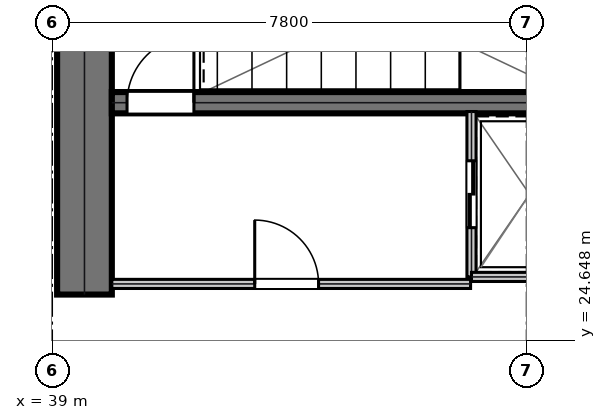
"""IFC4 building model, lengths in metres.
Left out: names, types, materials, properties, quantities, classifications, styles, units other than length and angle.
Written with IfcOpenShell. Run it as: python <this file> out.ifc"""

import sys

from ifc_helpers import new_model, si_unit, direction, frame, frame_2d, origin, place, context, subcontext, project, spatial, rectangle, extrude, element, fill, save


model = new_model("IFC4")
c1 = context("Model", 3, precision=1e-05, world=origin(), true_north=direction((0.0, 1.0)))
c2 = subcontext(c1, "Body", "Model", "MODEL_VIEW")
j1 = project(units=[si_unit("LENGTHUNIT", "METRE"), si_unit("PLANEANGLEUNIT", "RADIAN")], contexts=[c1])
p1 = place(None, origin())
s1 = spatial("IfcSite", under=j1, at=p1, CompositionType="ELEMENT")
p2 = place(p1, origin())
s2 = spatial("IfcBuilding", under=s1, at=p2, CompositionType="ELEMENT")
p3 = place(p2, frame((0.0, 0.0, 27.0)))
s3 = spatial("IfcBuildingStorey", under=s2, at=p3, CompositionType="ELEMENT", Elevation=27.0)
p4 = place(p3, frame((39.53, 25.4, 0.0), z_axis=(0.0, 0.0, 1.0), x_axis=(0.0, 1.0, 0.0)))
e1 = element("IfcWall", 1, at=p4, inside=s3, PredefinedType="SHEAR", context=c2, shape_type="SweptSolid", body=[
    extrude(rectangle(XDim=6.15, YDim=0.9, at=frame_2d((3.075, 0.0))), origin(), (0.0, 0.0, 1.0), 5.08),
])
p5 = place(p3, frame((39.98, 28.555, 0.0), z_axis=(0.0, 0.0, 1.0), x_axis=(1.0, 0.0, 0.0)))
e2 = element("IfcWall", 2, at=p5, inside=s3, PredefinedType="SHEAR", context=c2, shape_type="SweptSolid", body=[
    extrude(rectangle(XDim=7.71, YDim=0.35, at=frame_2d((3.855, 0.0))), origin(), (0.0, 0.0, 1.0), 5.08),
])
p6 = place(p5, frame((0.25, 0.0, 0.0)))
e3 = element("IfcOpeningElement", 3, at=p6, cuts=e2, PredefinedType="OPENING", context=c2, shape_type="SweptSolid", body=[
    extrude(rectangle(XDim=1.1, YDim=2.15, at=frame_2d((0.55, 1.075))), frame((0.0, 0.185, 0.0), z_axis=(0.0, -1.0, 0.0), x_axis=(1.0, 0.0, 0.0)), (0.0, 0.0, 1.0), 0.37),
])
p7 = place(p3, frame((39.98, 25.575, 0.0), z_axis=(0.0, 0.0, 1.0), x_axis=(1.0, 0.0, 0.0)))
e4 = element("IfcWall", 4, at=p7, inside=s3, PredefinedType="PARTITIONING", context=c2, shape_type="SweptSolid", body=[
    extrude(rectangle(XDim=5.9, YDim=0.15, at=frame_2d((2.95, 0.0))), origin(), (0.0, 0.0, 1.0), 5.08),
])
p8 = place(p7, frame((2.35, 0.0, 0.0)))
e5 = element("IfcOpeningElement", 5, at=p8, cuts=e4, PredefinedType="OPENING", context=c2, shape_type="SweptSolid", body=[
    extrude(rectangle(XDim=1.05, YDim=2.15, at=frame_2d((0.525, 1.075))), frame((0.0, 0.085, 0.0), z_axis=(0.0, -1.0, 0.0), x_axis=(1.0, 0.0, 0.0)), (0.0, 0.0, 1.0), 0.17),
])
p9 = place(p3, frame((45.895, 25.69, 0.0), z_axis=(0.0, 0.0, 1.0), x_axis=(0.0, 1.0, 0.0)))
e6 = element("IfcWall", 6, at=p9, inside=s3, PredefinedType="PARTITIONING", context=c2, shape_type="SweptSolid", body=[
    extrude(rectangle(XDim=2.72, YDim=0.15, at=frame_2d((1.36, 0.0))), origin(), (0.0, 0.0, 1.0), 5.08),
])
p10 = place(p9, frame((0.81, 0.0, 0.0)))
e7 = element("IfcOpeningElement", 7, at=p10, cuts=e6, PredefinedType="OPENING", context=c2, shape_type="SweptSolid", body=[
    extrude(rectangle(XDim=1.1, YDim=2.15, at=frame_2d((0.55, 1.075))), frame((0.0, 0.085, 0.0), z_axis=(0.0, -1.0, 0.0), x_axis=(1.0, 0.0, 0.0)), (0.0, 0.0, 1.0), 0.17),
])
p11 = place(p3, frame((45.895, 25.69, 0.0), z_axis=(0.0, 0.0, 1.0), x_axis=(1.0, 0.0, 0.0)))
e8 = element("IfcWall", 8, at=p11, inside=s3, PredefinedType="PARTITIONING", context=c2, shape_type="SweptSolid", body=[
    extrude(rectangle(XDim=1.915, YDim=0.15, at=frame_2d((0.958, 0.0))), origin(), (0.0, 0.0, 1.0), 5.08),
])
p12 = place(p8, origin())
e9 = element("IfcDoor", 9, at=p12, inside=s3, OperationType="SINGLE_SWING_LEFT", PredefinedType="DOOR", context=c2, shape_type="SweptSolid", body=[
    extrude(rectangle(XDim=1.05, YDim=2.15, at=frame_2d((0.525, 1.075))), frame((0.0, 0.025, 0.0), z_axis=(0.0, -1.0, 0.0), x_axis=(1.0, 0.0, 0.0)), (0.0, 0.0, 1.0), 0.05),
])
fill(e5, e9)
p13 = place(p10, frame((1.1, 0.0, 0.0), z_axis=(0.0, 0.0, 1.0), x_axis=(-1.0, 0.0, 0.0)))
e10 = element("IfcDoor", 10, at=p13, inside=s3, OperationType="DOUBLE_DOOR_SLIDING", PredefinedType="DOOR", context=c2, shape_type="SweptSolid", body=[
    extrude(rectangle(XDim=1.1, YDim=2.15, at=frame_2d((0.55, 1.075))), frame((0.0, 0.025, 0.0), z_axis=(0.0, -1.0, 0.0), x_axis=(1.0, 0.0, 0.0)), (0.0, 0.0, 1.0), 0.05),
])
fill(e7, e10)
p14 = place(p6, origin())
e11 = element("IfcDoor", 11, at=p14, inside=s3, OperationType="SINGLE_SWING_RIGHT", PredefinedType="DOOR", context=c2, shape_type="SweptSolid", body=[
    extrude(rectangle(XDim=1.1, YDim=2.15, at=frame_2d((0.55, 1.075))), frame((0.0, 0.025, 0.0), z_axis=(0.0, -1.0, 0.0), x_axis=(1.0, 0.0, 0.0)), (0.0, 0.0, 1.0), 0.05),
])
fill(e3, e11)
save(model, sys.argv[1])
